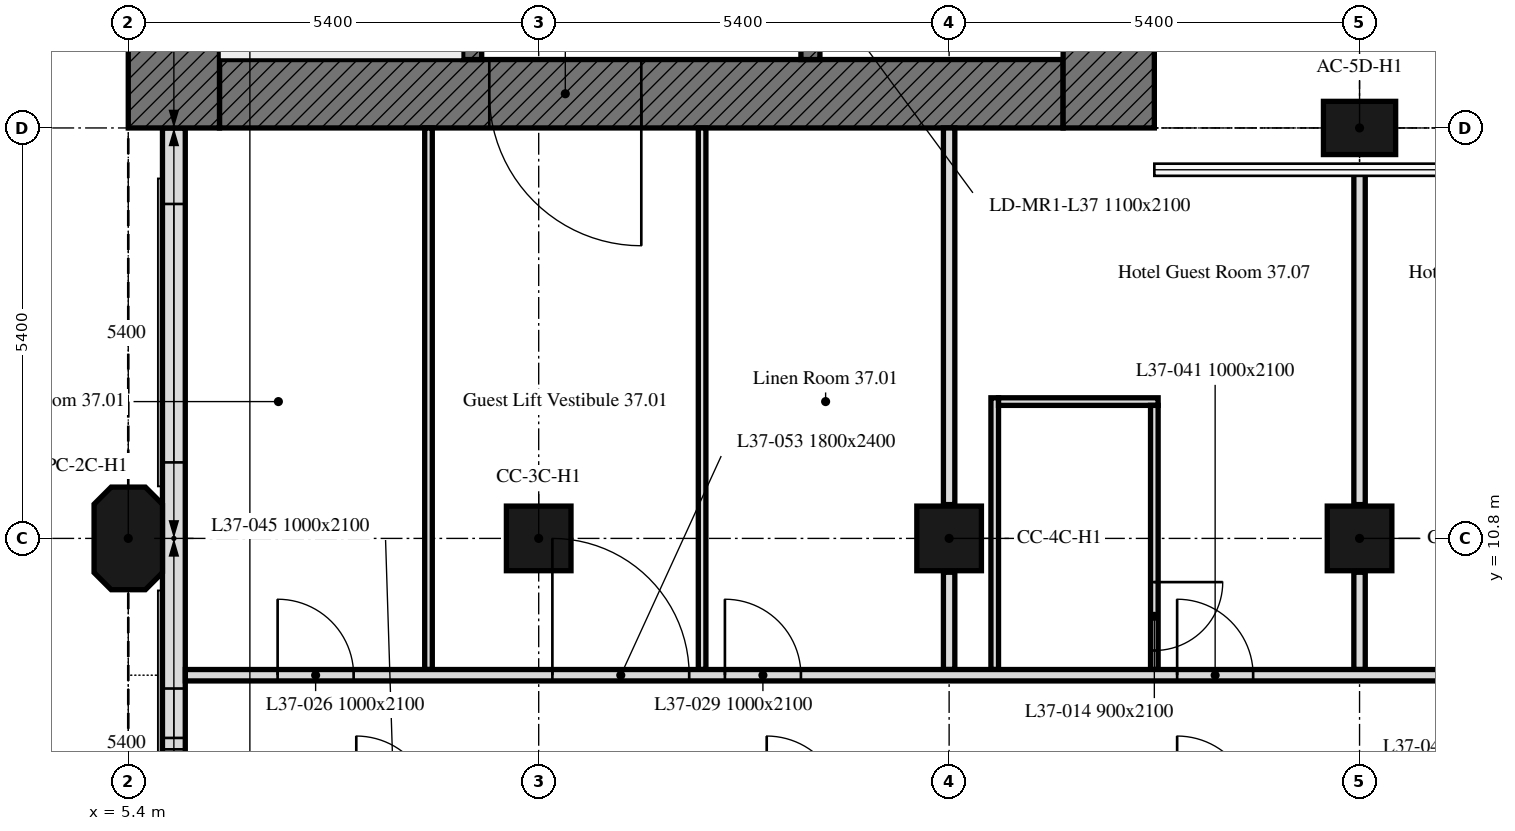
"""IFC4 building model, lengths in metres.
Left out: names, types, materials, properties, quantities, classifications, styles, units other than length and angle.
Written with IfcOpenShell. Run it as: python <this file> out.ifc"""

import sys

from ifc_helpers import new_model, si_unit, direction, frame, frame_2d, origin, origin_2d, place, context, subcontext, project, spatial, polyline, rectangle, outline, extrude, element, fill, save


model = new_model("IFC4")
c1 = context("Model", 3, precision=1e-05, world=origin(), true_north=direction((0.0, 1.0)))
c2 = subcontext(c1, "Body", "Model", "MODEL_VIEW")
j1 = project(units=[si_unit("LENGTHUNIT", "METRE"), si_unit("PLANEANGLEUNIT", "RADIAN")], contexts=[c1])
p1 = place(None, origin())
s1 = spatial("IfcSite", under=j1, at=p1, CompositionType="ELEMENT")
p2 = place(p1, origin())
s2 = spatial("IfcBuilding", under=s1, at=p2, CompositionType="ELEMENT")
p3 = place(p2, frame((0.0, 0.0, 159.4)))
s3 = spatial("IfcBuildingStorey", under=s2, at=p3, CompositionType="ELEMENT", Elevation=159.4)
p4 = place(p3, frame((5.4, 10.8, 0.0), z_axis=(0.0, 0.0, 1.0), x_axis=(0.0, 1.0, 0.0)))
e1 = element("IfcColumn", 1, at=p4, inside=s3, PredefinedType="COLUMN", context=c2, shape_type="SweptSolid", body=[
    extrude(outline(polyline([(-0.45, -0.45), (0.45, -0.45), (0.675, -0.225), (0.675, 0.225), (0.45, 0.45), (-0.45, 0.45), (-0.675, 0.225), (-0.675, -0.225), (-0.45, -0.45)])), origin(), (0.0, 0.0, 1.0), 3.0),
])
for number, where, z_axis, x_axis in (
    (2, (10.8, 10.8, 0.0), (0.0, 0.0, 1.0), (1.0, 0.0, 0.0)),
    (3, (16.2, 10.8, 0.0), (0.0, 0.0, 1.0), (1.0, 0.0, 0.0)),
    (4, (21.6, 10.8, 0.0), (0.0, 0.0, 1.0), (1.0, 0.0, 0.0)),
):
    element("IfcColumn", number, at=place(p3, frame(where, z_axis=z_axis, x_axis=x_axis)), inside=s3, PredefinedType="COLUMN", context=c2, shape_type="SweptSolid", body=[
        extrude(rectangle(XDim=0.85, YDim=0.85, at=origin_2d()), origin(), (0.0, 0.0, 1.0), 3.0),
    ])
p5 = place(p3, frame((21.6, 16.2, 0.0), z_axis=(0.0, 0.0, 1.0), x_axis=(1.0, 0.0, 0.0)))
e5 = element("IfcColumn", 5, at=p5, inside=s3, PredefinedType="COLUMN", context=c2, shape_type="SweptSolid", body=[
    extrude(rectangle(XDim=0.95, YDim=0.7, at=origin_2d()), origin(), (0.0, 0.0, 1.0), 3.0),
])
p6 = place(p3, frame((6.0, 16.2, 0.0), z_axis=(0.0, 0.0, 1.0), x_axis=(0.0, -1.0, 0.0)))
e6 = element("IfcWall", 6, at=p6, inside=s3, PredefinedType="SOLIDWALL", context=c2, shape_type="SweptSolid", body=[
    extrude(rectangle(XDim=10.614, YDim=0.3, at=frame_2d((5.307, 0.0))), origin(), (0.0, 0.0, 1.0), 3.0),
])
p7 = place(p6, frame((1.0, 0.0, 0.9)))
e7 = element("IfcOpeningElement", 7, at=p7, cuts=e6, PredefinedType="OPENING", context=c2, shape_type="SweptSolid", body=[
    extrude(rectangle(XDim=3.4, YDim=1.7, at=frame_2d((1.7, 0.85))), frame((0.0, 0.16, 0.0), z_axis=(0.0, -1.0, 0.0), x_axis=(1.0, 0.0, 0.0)), (0.0, 0.0, 1.0), 0.32),
])
p8 = place(p6, frame((7.375, 0.0, 0.9)))
e8 = element("IfcOpeningElement", 8, at=p8, cuts=e6, PredefinedType="OPENING", context=c2, shape_type="SweptSolid", body=[
    extrude(rectangle(XDim=0.65, YDim=1.7, at=frame_2d((0.325, 0.85))), frame((0.0, 0.16, 0.0), z_axis=(0.0, -1.0, 0.0), x_axis=(1.0, 0.0, 0.0)), (0.0, 0.0, 1.0), 0.32),
])
p9 = place(p6, frame((8.175, 0.0, 0.9)))
e9 = element("IfcOpeningElement", 9, at=p9, cuts=e6, PredefinedType="OPENING", context=c2, shape_type="SweptSolid", body=[
    extrude(rectangle(XDim=0.65, YDim=1.7, at=frame_2d((0.325, 0.85))), frame((0.0, 0.16, 0.0), z_axis=(0.0, -1.0, 0.0), x_axis=(1.0, 0.0, 0.0)), (0.0, 0.0, 1.0), 0.32),
])
p10 = place(p3, frame((17.7, 16.65, 0.0), z_axis=(0.0, 0.0, 1.0), x_axis=(-1.0, 0.0, 0.0)))
e10 = element("IfcWall", 10, at=p10, inside=s3, PredefinedType="SOLIDWALL", context=c2, shape_type="SweptSolid", body=[
    extrude(rectangle(XDim=11.1, YDim=0.9, at=frame_2d((5.55, 0.0))), origin(), (0.0, 0.0, 1.0), 3.0),
])
p11 = place(p10, frame((5.55, 0.0, 0.0)))
e11 = element("IfcOpeningElement", 11, at=p11, cuts=e10, PredefinedType="OPENING", context=c2, shape_type="SweptSolid", body=[
    extrude(rectangle(XDim=2.0, YDim=2.4, at=frame_2d((1.0, 1.2))), frame((0.0, 0.45, 0.0), z_axis=(0.0, -1.0, 0.0), x_axis=(1.0, 0.0, 0.0)), (0.0, 0.0, 1.0), 0.9),
])
for number, where, z_axis, x_axis in (
    (12, (6.0, 16.2, 0.0), (0.0, 0.0, 1.0), (0.0, 1.0, 0.0)),
    (13, (18.3, 32.4, 0.0), (0.0, 0.0, 1.0), (0.0, -1.0, 0.0)),
):
    element("IfcWall", number, at=place(p3, frame(where, z_axis=z_axis, x_axis=x_axis)), inside=s3, PredefinedType="SOLIDWALL", context=c2, shape_type="SweptSolid", body=[
        extrude(rectangle(XDim=16.2, YDim=1.2, at=frame_2d((8.1, 0.0))), origin(), (0.0, 0.0, 1.0), 3.0),
    ])
p12 = place(p3, frame((9.925, 17.1, 0.0), z_axis=(0.0, 0.0, 1.0), x_axis=(0.0, 1.0, 0.0)))
e14 = element("IfcWall", 14, at=p12, inside=s3, PredefinedType="SOLIDWALL", context=c2, shape_type="SweptSolid", body=[
    extrude(rectangle(XDim=14.4, YDim=0.25, at=frame_2d((7.2, 0.0))), origin(), (0.0, 0.0, 1.0), 3.0),
])
p13 = place(p12, frame((4.6, 0.0, 0.0)))
e15 = element("IfcOpeningElement", 15, at=p13, cuts=e14, PredefinedType="OPENING", context=c2, shape_type="SweptSolid", body=[
    extrude(rectangle(XDim=1.0, YDim=2.1, at=frame_2d((0.5, 1.05))), frame((0.0, 0.125, 0.0), z_axis=(0.0, -1.0, 0.0), x_axis=(1.0, 0.0, 0.0)), (0.0, 0.0, 1.0), 0.25),
])
p14 = place(p12, frame((7.062, 0.0, 0.0)))
e16 = element("IfcOpeningElement", 16, at=p14, cuts=e14, PredefinedType="OPENING", context=c2, shape_type="SweptSolid", body=[
    extrude(rectangle(XDim=1.2, YDim=2.1, at=frame_2d((0.6, 1.05))), frame((0.0, 0.125, 0.0), z_axis=(0.0, -1.0, 0.0), x_axis=(1.0, 0.0, 0.0)), (0.0, 0.0, 1.0), 0.25),
])
p15 = place(p12, frame((9.472, 0.0, 0.0)))
e17 = element("IfcOpeningElement", 17, at=p15, cuts=e14, PredefinedType="OPENING", context=c2, shape_type="SweptSolid", body=[
    extrude(rectangle(XDim=0.9, YDim=2.1, at=frame_2d((0.45, 1.05))), frame((0.0, 0.125, 0.0), z_axis=(0.0, -1.0, 0.0), x_axis=(1.0, 0.0, 0.0)), (0.0, 0.0, 1.0), 0.25),
])
p16 = place(p12, frame((11.159, 0.0, 0.0)))
e18 = element("IfcOpeningElement", 18, at=p16, cuts=e14, PredefinedType="OPENING", context=c2, shape_type="SweptSolid", body=[
    extrude(rectangle(XDim=0.9, YDim=2.1, at=frame_2d((0.45, 1.05))), frame((0.0, 0.125, 0.0), z_axis=(0.0, -1.0, 0.0), x_axis=(1.0, 0.0, 0.0)), (0.0, 0.0, 1.0), 0.25),
])
p17 = place(p12, frame((13.1, 0.0, 0.0)))
e19 = element("IfcOpeningElement", 19, at=p17, cuts=e14, PredefinedType="OPENING", context=c2, shape_type="SweptSolid", body=[
    extrude(rectangle(XDim=0.9, YDim=2.1, at=frame_2d((0.45, 1.05))), frame((0.0, 0.125, 0.0), z_axis=(0.0, -1.0, 0.0), x_axis=(1.0, 0.0, 0.0)), (0.0, 0.0, 1.0), 0.25),
])
p18 = place(p3, frame((14.375, 17.1, 0.0), z_axis=(0.0, 0.0, 1.0), x_axis=(0.0, 1.0, 0.0)))
e20 = element("IfcWall", 20, at=p18, inside=s3, PredefinedType="SOLIDWALL", context=c2, shape_type="SweptSolid", body=[
    extrude(rectangle(XDim=14.4, YDim=0.25, at=frame_2d((7.2, 0.0))), origin(), (0.0, 0.0, 1.0), 3.0),
])
p19 = place(p18, frame((13.15, 0.0, 0.0)))
e21 = element("IfcOpeningElement", 21, at=p19, cuts=e20, PredefinedType="OPENING", context=c2, shape_type="SweptSolid", body=[
    extrude(rectangle(XDim=1.0, YDim=2.1, at=frame_2d((0.5, 1.05))), frame((0.0, 0.125, 0.0), z_axis=(0.0, -1.0, 0.0), x_axis=(1.0, 0.0, 0.0)), (0.0, 0.0, 1.0), 0.25),
])
p20 = place(p18, frame((0.6, 0.0, 0.0)))
e22 = element("IfcOpeningElement", 22, at=p20, cuts=e20, PredefinedType="OPENING", context=c2, shape_type="SweptSolid", body=[
    extrude(rectangle(XDim=1.1, YDim=2.1, at=frame_2d((0.55, 1.05))), frame((0.0, 0.125, 0.0), z_axis=(0.0, -1.0, 0.0), x_axis=(1.0, 0.0, 0.0)), (0.0, 0.0, 1.0), 0.25),
])
p21 = place(p18, frame((3.25, 0.0, 0.0)))
e23 = element("IfcOpeningElement", 23, at=p21, cuts=e20, PredefinedType="OPENING", context=c2, shape_type="SweptSolid", body=[
    extrude(rectangle(XDim=0.9, YDim=2.1, at=frame_2d((0.45, 1.05))), frame((0.0, 0.125, 0.0), z_axis=(0.0, -1.0, 0.0), x_axis=(1.0, 0.0, 0.0)), (0.0, 0.0, 1.0), 0.25),
])
p22 = place(p3, frame((16.2, 16.2, 0.0), z_axis=(0.0, 0.0, 1.0), x_axis=(0.0, -1.0, 0.0)))
e24 = element("IfcWall", 24, at=p22, inside=s3, PredefinedType="PARTITIONING", context=c2, shape_type="SweptSolid", body=[
    extrude(rectangle(XDim=4.955, YDim=0.15, at=frame_2d((2.478, 0.0))), origin(), (0.0, 0.0, 1.0), 2.4),
])
p23 = place(p3, frame((16.2, 10.355, 0.0), z_axis=(0.0, 0.0, 1.0), x_axis=(0.0, -1.0, 0.0)))
e25 = element("IfcWall", 25, at=p23, inside=s3, PredefinedType="PARTITIONING", context=c2, shape_type="SweptSolid", body=[
    extrude(rectangle(XDim=1.28, YDim=0.15, at=frame_2d((0.64, 0.0))), origin(), (0.0, 0.0, 1.0), 2.4),
])
p24 = place(p3, frame((16.8, 9.075, 0.0), z_axis=(0.0, 0.0, 1.0), x_axis=(0.0, 1.0, 0.0)))
e26 = element("IfcWall", 26, at=p24, inside=s3, PredefinedType="PARTITIONING", context=c2, shape_type="SweptSolid", body=[
    extrude(rectangle(XDim=3.575, YDim=0.1, at=frame_2d((1.788, 0.0))), origin(), (0.0, 0.0, 1.0), 3.0),
])
p25 = place(p3, frame((16.85, 12.6, 0.0), z_axis=(0.0, 0.0, 1.0), x_axis=(1.0, 0.0, 0.0)))
e27 = element("IfcWall", 27, at=p25, inside=s3, PredefinedType="PARTITIONING", context=c2, shape_type="SweptSolid", body=[
    extrude(rectangle(XDim=2.1, YDim=0.1, at=frame_2d((1.05, 0.0))), origin(), (0.0, 0.0, 1.0), 3.0),
])
p26 = place(p3, frame((18.9, 12.55, 0.0), z_axis=(0.0, 0.0, 1.0), x_axis=(0.0, -1.0, 0.0)))
e28 = element("IfcWall", 28, at=p26, inside=s3, PredefinedType="PARTITIONING", context=c2, shape_type="SweptSolid", body=[
    extrude(rectangle(XDim=3.475, YDim=0.1, at=frame_2d((1.738, 0.0))), origin(), (0.0, 0.0, 1.0), 3.0),
])
p27 = place(p26, frame((2.325, 0.0, 0.0)))
e29 = element("IfcOpeningElement", 29, at=p27, cuts=e28, PredefinedType="OPENING", context=c2, shape_type="SweptSolid", body=[
    extrude(rectangle(XDim=0.9, YDim=2.1, at=frame_2d((0.45, 1.05))), frame((0.0, 0.05, 0.0), z_axis=(0.0, -1.0, 0.0), x_axis=(1.0, 0.0, 0.0)), (0.0, 0.0, 1.0), 0.1),
])
p28 = place(p3, frame((21.6, 9.075, 0.0), z_axis=(0.0, 0.0, 1.0), x_axis=(0.0, 1.0, 0.0)))
e30 = element("IfcWall", 30, at=p28, inside=s3, PredefinedType="PARTITIONING", context=c2, shape_type="SweptSolid", body=[
    extrude(rectangle(XDim=1.28, YDim=0.15, at=frame_2d((0.64, 0.0))), origin(), (0.0, 0.0, 1.0), 2.4),
])
p29 = place(p3, frame((21.6, 11.245, 0.0), z_axis=(0.0, 0.0, 1.0), x_axis=(0.0, 1.0, 0.0)))
e31 = element("IfcWall", 31, at=p29, inside=s3, PredefinedType="PARTITIONING", context=c2, shape_type="SweptSolid", body=[
    extrude(rectangle(XDim=4.46, YDim=0.15, at=frame_2d((2.23, 0.0))), origin(), (0.0, 0.0, 1.0), 2.4),
])
for number, where, z_axis, x_axis in (
    (32, (9.35, 16.2, 0.0), (0.0, 0.0, 1.0), (0.0, -1.0, 0.0)),
    (33, (12.95, 9.075, 0.0), (0.0, 0.0, 1.0), (0.0, 1.0, 0.0)),
):
    element("IfcWall", number, at=place(p3, frame(where, z_axis=z_axis, x_axis=x_axis)), inside=s3, PredefinedType="PARTITIONING", context=c2, shape_type="SweptSolid", body=[
        extrude(rectangle(XDim=7.125, YDim=0.1, at=frame_2d((3.562, 0.0))), origin(), (0.0, 0.0, 1.0), 3.0),
    ])
p30 = place(p3, frame((6.151, 9.0, 0.0), z_axis=(0.0, 0.0, 1.0), x_axis=(1.0, 0.0, 0.0)))
e34 = element("IfcWall", 34, at=p30, inside=s3, PredefinedType="PARTITIONING", context=c2, shape_type="SweptSolid", body=[
    extrude(rectangle(XDim=36.974, YDim=0.15, at=frame_2d((18.487, 0.0))), origin(), (0.0, 0.0, 1.0), 2.4),
])
p31 = place(p30, frame((1.214, 0.0, 0.0)))
e35 = element("IfcOpeningElement", 35, at=p31, cuts=e34, PredefinedType="OPENING", context=c2, shape_type="SweptSolid", body=[
    extrude(rectangle(XDim=1.0, YDim=2.1, at=frame_2d((0.5, 1.05))), frame((0.0, 0.075, 0.0), z_axis=(0.0, -1.0, 0.0), x_axis=(1.0, 0.0, 0.0)), (0.0, 0.0, 1.0), 0.15),
])
p32 = place(p30, frame((28.199, 0.0, 0.0)))
e36 = element("IfcOpeningElement", 36, at=p32, cuts=e34, PredefinedType="OPENING", context=c2, shape_type="SweptSolid", body=[
    extrude(rectangle(XDim=1.0, YDim=2.1, at=frame_2d((0.5, 1.05))), frame((0.0, 0.075, 0.0), z_axis=(0.0, -1.0, 0.0), x_axis=(1.0, 0.0, 0.0)), (0.0, 0.0, 1.0), 0.15),
])
p33 = place(p30, frame((7.099, 0.0, 0.0)))
e37 = element("IfcOpeningElement", 37, at=p33, cuts=e34, PredefinedType="OPENING", context=c2, shape_type="SweptSolid", body=[
    extrude(rectangle(XDim=1.0, YDim=2.1, at=frame_2d((0.5, 1.05))), frame((0.0, 0.075, 0.0), z_axis=(0.0, -1.0, 0.0), x_axis=(1.0, 0.0, 0.0)), (0.0, 0.0, 1.0), 0.15),
])
p34 = place(p30, frame((13.049, 0.0, 0.0)))
e38 = element("IfcOpeningElement", 38, at=p34, cuts=e34, PredefinedType="OPENING", context=c2, shape_type="SweptSolid", body=[
    extrude(rectangle(XDim=1.0, YDim=2.1, at=frame_2d((0.5, 1.05))), frame((0.0, 0.075, 0.0), z_axis=(0.0, -1.0, 0.0), x_axis=(1.0, 0.0, 0.0)), (0.0, 0.0, 1.0), 0.15),
])
p35 = place(p30, frame((16.849, 0.0, 0.0)))
e39 = element("IfcOpeningElement", 39, at=p35, cuts=e34, PredefinedType="OPENING", context=c2, shape_type="SweptSolid", body=[
    extrude(rectangle(XDim=1.0, YDim=2.1, at=frame_2d((0.5, 1.05))), frame((0.0, 0.075, 0.0), z_axis=(0.0, -1.0, 0.0), x_axis=(1.0, 0.0, 0.0)), (0.0, 0.0, 1.0), 0.15),
])
p36 = place(p30, frame((23.849, 0.0, 0.0)))
e40 = element("IfcOpeningElement", 40, at=p36, cuts=e34, PredefinedType="OPENING", context=c2, shape_type="SweptSolid", body=[
    extrude(rectangle(XDim=1.0, YDim=2.1, at=frame_2d((0.5, 1.05))), frame((0.0, 0.075, 0.0), z_axis=(0.0, -1.0, 0.0), x_axis=(1.0, 0.0, 0.0)), (0.0, 0.0, 1.0), 0.15),
])
p37 = place(p30, frame((4.829, 0.0, 0.0)))
e41 = element("IfcOpeningElement", 41, at=p37, cuts=e34, PredefinedType="OPENING", context=c2, shape_type="SweptSolid", body=[
    extrude(rectangle(XDim=1.8, YDim=2.4, at=frame_2d((0.9, 1.2))), frame((0.0, 0.075, 0.0), z_axis=(0.0, -1.0, 0.0), x_axis=(1.0, 0.0, 0.0)), (0.0, 0.0, 1.0), 0.15),
])
p38 = place(p30, frame((30.199, 0.0, 0.0)))
e42 = element("IfcOpeningElement", 42, at=p38, cuts=e34, PredefinedType="OPENING", context=c2, shape_type="SweptSolid", body=[
    extrude(rectangle(XDim=1.0, YDim=2.1, at=frame_2d((0.5, 1.05))), frame((0.0, 0.075, 0.0), z_axis=(0.0, -1.0, 0.0), x_axis=(1.0, 0.0, 0.0)), (0.0, 0.0, 1.0), 0.15),
])
p39 = place(p7, origin())
e43 = element("IfcWindow", 43, at=p39, inside=s3, PartitioningType="SINGLE_PANEL", PredefinedType="WINDOW", context=c2, shape_type="SweptSolid", body=[
    extrude(rectangle(XDim=3.4, YDim=1.7, at=frame_2d((1.7, 0.85))), frame((0.0, 0.03, 0.0), z_axis=(0.0, -1.0, 0.0), x_axis=(1.0, 0.0, 0.0)), (0.0, 0.0, 1.0), 0.06),
])
fill(e7, e43)
p40 = place(p8, origin())
e44 = element("IfcWindow", 44, at=p40, inside=s3, PartitioningType="SINGLE_PANEL", PredefinedType="WINDOW", context=c2, shape_type="SweptSolid", body=[
    extrude(rectangle(XDim=0.65, YDim=1.7, at=frame_2d((0.325, 0.85))), frame((0.0, 0.03, 0.0), z_axis=(0.0, -1.0, 0.0), x_axis=(1.0, 0.0, 0.0)), (0.0, 0.0, 1.0), 0.06),
])
fill(e8, e44)
p41 = place(p9, origin())
e45 = element("IfcWindow", 45, at=p41, inside=s3, PartitioningType="SINGLE_PANEL", PredefinedType="WINDOW", context=c2, shape_type="SweptSolid", body=[
    extrude(rectangle(XDim=0.65, YDim=1.7, at=frame_2d((0.325, 0.85))), frame((0.0, 0.03, 0.0), z_axis=(0.0, -1.0, 0.0), x_axis=(1.0, 0.0, 0.0)), (0.0, 0.0, 1.0), 0.06),
])
fill(e9, e45)
p42 = place(p11, origin())
e46 = element("IfcDoor", 46, at=p42, inside=s3, OperationType="DOUBLE_DOOR_SINGLE_SWING", PredefinedType="DOOR", context=c2, shape_type="SweptSolid", body=[
    extrude(rectangle(XDim=2.0, YDim=2.4, at=frame_2d((1.0, 1.2))), frame((0.0, 0.025, 0.0), z_axis=(0.0, -1.0, 0.0), x_axis=(1.0, 0.0, 0.0)), (0.0, 0.0, 1.0), 0.05),
])
fill(e11, e46)
p43 = place(p27, origin())
e47 = element("IfcDoor", 47, at=p43, inside=s3, OperationType="SINGLE_SWING_LEFT", PredefinedType="DOOR", context=c2, shape_type="SweptSolid", body=[
    extrude(rectangle(XDim=0.9, YDim=2.1, at=frame_2d((0.45, 1.05))), frame((0.0, 0.025, 0.0), z_axis=(0.0, -1.0, 0.0), x_axis=(1.0, 0.0, 0.0)), (0.0, 0.0, 1.0), 0.05),
])
fill(e29, e47)
p44 = place(p31, origin())
e48 = element("IfcDoor", 48, at=p44, inside=s3, OperationType="SINGLE_SWING_LEFT", PredefinedType="DOOR", context=c2, shape_type="SweptSolid", body=[
    extrude(rectangle(XDim=1.0, YDim=2.1, at=frame_2d((0.5, 1.05))), frame((0.0, 0.025, 0.0), z_axis=(0.0, -1.0, 0.0), x_axis=(1.0, 0.0, 0.0)), (0.0, 0.0, 1.0), 0.05),
])
fill(e35, e48)
p45 = place(p33, origin())
e49 = element("IfcDoor", 49, at=p45, inside=s3, OperationType="SINGLE_SWING_RIGHT", PredefinedType="DOOR", context=c2, shape_type="SweptSolid", body=[
    extrude(rectangle(XDim=1.0, YDim=2.1, at=frame_2d((0.5, 1.05))), frame((0.0, 0.025, 0.0), z_axis=(0.0, -1.0, 0.0), x_axis=(1.0, 0.0, 0.0)), (0.0, 0.0, 1.0), 0.05),
])
fill(e37, e49)
p46 = place(p34, origin())
e50 = element("IfcDoor", 50, at=p46, inside=s3, OperationType="SINGLE_SWING_RIGHT", PredefinedType="DOOR", context=c2, shape_type="SweptSolid", body=[
    extrude(rectangle(XDim=1.0, YDim=2.1, at=frame_2d((0.5, 1.05))), frame((0.0, 0.025, 0.0), z_axis=(0.0, -1.0, 0.0), x_axis=(1.0, 0.0, 0.0)), (0.0, 0.0, 1.0), 0.05),
])
fill(e38, e50)
p47 = place(p37, origin())
e51 = element("IfcDoor", 51, at=p47, inside=s3, OperationType="DOUBLE_DOOR_SINGLE_SWING", PredefinedType="DOOR", context=c2, shape_type="SweptSolid", body=[
    extrude(rectangle(XDim=1.8, YDim=2.4, at=frame_2d((0.9, 1.2))), frame((0.0, 0.025, 0.0), z_axis=(0.0, -1.0, 0.0), x_axis=(1.0, 0.0, 0.0)), (0.0, 0.0, 1.0), 0.05),
])
fill(e41, e51)
save(model, sys.argv[1])
